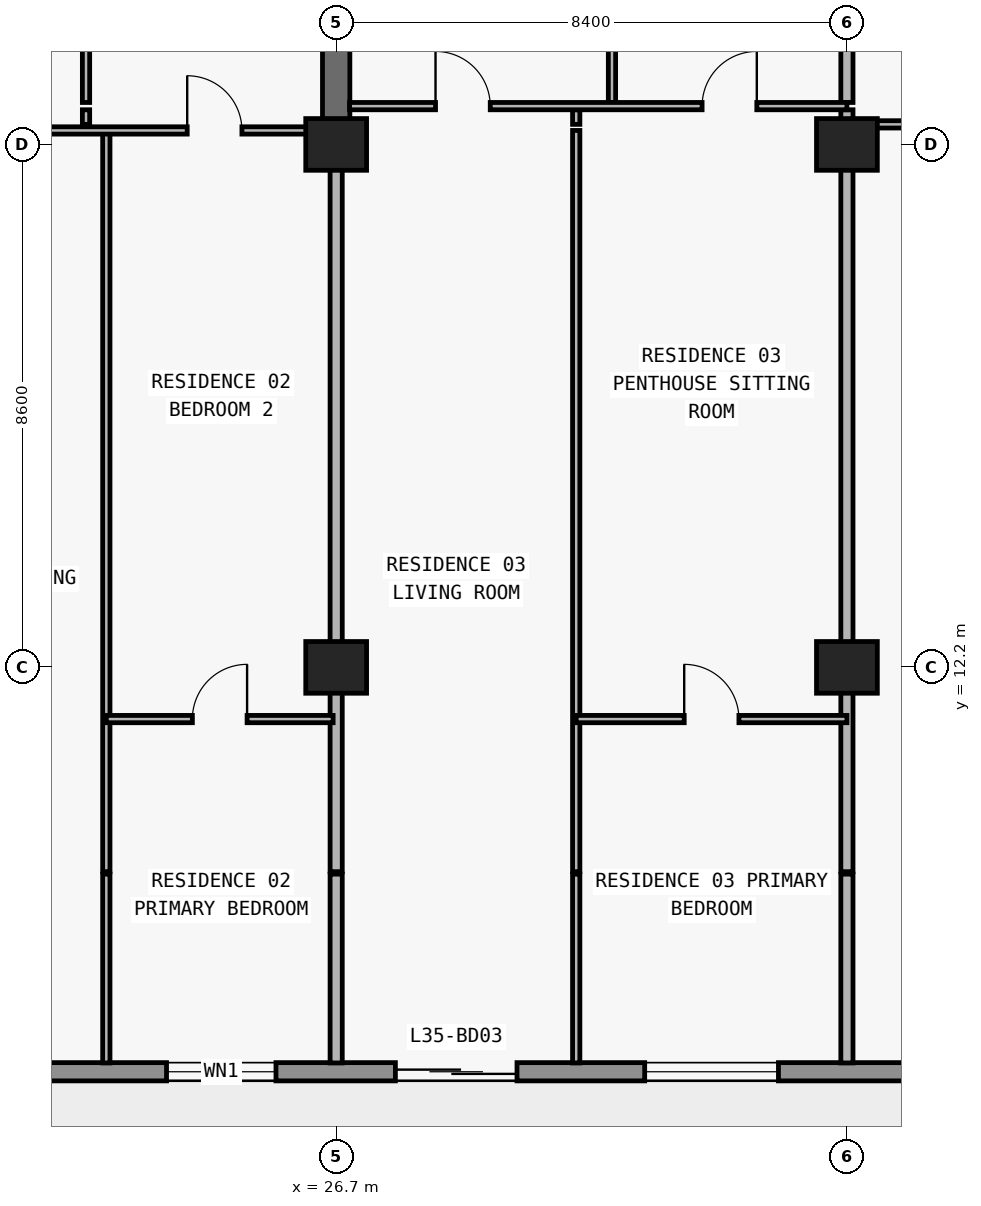
"""IFC4 building model, lengths in metres.
Left out: names, types, materials, properties, quantities, classifications, styles, units other than length and angle.
Written with IfcOpenShell. Run it as: python <this file> out.ifc"""

import sys

from ifc_helpers import new_model, si_unit, direction, frame, frame_2d, origin, origin_2d, place, context, subcontext, project, spatial, rectangle, extrude, element, fill, save


model = new_model("IFC4")
c1 = context("Model", 3, precision=1e-05, world=origin(), true_north=direction((0.0, 1.0)))
c2 = subcontext(c1, "Body", "Model", "MODEL_VIEW")
j1 = project(units=[si_unit("LENGTHUNIT", "METRE"), si_unit("PLANEANGLEUNIT", "RADIAN")], contexts=[c1])
p1 = place(None, origin())
s1 = spatial("IfcSite", under=j1, at=p1, CompositionType="ELEMENT")
p2 = place(p1, origin())
s2 = spatial("IfcBuilding", under=s1, at=p2, CompositionType="ELEMENT")
p3 = place(p2, frame((0.0, 0.0, 129.0)))
s3 = spatial("IfcBuildingStorey", under=s2, at=p3, CompositionType="ELEMENT", Elevation=129.0)
for number, where, z_axis, x_axis in (
    (1, (26.7, 12.2, 0.0), (0.0, 0.0, 1.0), (1.0, 0.0, 0.0)),
    (2, (35.1, 12.2, 0.0), (0.0, 0.0, 1.0), (1.0, 0.0, 0.0)),
    (3, (26.7, 20.8, 0.0), (0.0, 0.0, 1.0), (1.0, 0.0, 0.0)),
    (4, (35.1, 20.8, 0.0), (0.0, 0.0, 1.0), (1.0, 0.0, 0.0)),
):
    element("IfcColumn", number, at=place(p3, frame(where, z_axis=z_axis, x_axis=x_axis)), inside=s3, PredefinedType="COLUMN", context=c2, shape_type="SweptSolid", body=[
        extrude(rectangle(XDim=1.0, YDim=0.85, at=origin_2d()), origin(), (0.0, 0.0, 1.0), 3.05),
    ])
p4 = place(p3, frame((26.7, 20.8, 0.0), z_axis=(0.0, 0.0, 1.0), x_axis=(0.0, 1.0, 0.0)))
e5 = element("IfcWall", 5, at=p4, inside=s3, PredefinedType="SHEAR", context=c2, shape_type="SweptSolid", body=[
    extrude(rectangle(XDim=8.6, YDim=0.45, at=frame_2d((4.3, 0.0))), origin(), (0.0, 0.0, 1.0), 3.05),
])
p5 = place(p3, frame((70.1, 5.55, 0.0), z_axis=(0.0, 0.0, 1.0), x_axis=(-1.0, 0.0, 0.0)))
e6 = element("IfcWall", 6, at=p5, inside=s3, PredefinedType="STANDARD", context=c2, shape_type="SweptSolid", body=[
    extrude(rectangle(XDim=62.4, YDim=0.3, at=frame_2d((31.2, 0.0))), origin(), (0.0, 0.0, 1.0), 3.05),
])
p6 = place(p5, frame((57.226, 0.0, 0.0)))
e7 = element("IfcOpeningElement", 7, at=p6, cuts=e6, PredefinedType="OPENING", context=c2, shape_type="SweptSolid", body=[
    extrude(rectangle(XDim=2.0, YDim=2.3, at=frame_2d((1.0, 1.15))), frame((0.0, 0.16, 0.0), z_axis=(0.0, -1.0, 0.0), x_axis=(1.0, 0.0, 0.0)), (0.0, 0.0, 1.0), 0.32),
])
p7 = place(p5, frame((52.926, 0.0, 0.85)))
e8 = element("IfcOpeningElement", 8, at=p7, cuts=e6, PredefinedType="OPENING", context=c2, shape_type="SweptSolid", body=[
    extrude(rectangle(XDim=2.2, YDim=1.55, at=frame_2d((1.1, 0.775))), frame((0.0, 0.16, 0.0), z_axis=(0.0, -1.0, 0.0), x_axis=(1.0, 0.0, 0.0)), (0.0, 0.0, 1.0), 0.32),
])
p8 = place(p5, frame((48.49, 0.0, 0.0)))
e9 = element("IfcOpeningElement", 9, at=p8, cuts=e6, PredefinedType="OPENING", context=c2, shape_type="SweptSolid", body=[
    extrude(rectangle(XDim=2.0, YDim=2.3, at=frame_2d((1.0, 1.15))), frame((0.0, 0.16, 0.0), z_axis=(0.0, -1.0, 0.0), x_axis=(1.0, 0.0, 0.0)), (0.0, 0.0, 1.0), 0.32),
])
p9 = place(p5, frame((44.39, 0.0, 0.85)))
e10 = element("IfcOpeningElement", 10, at=p9, cuts=e6, PredefinedType="OPENING", context=c2, shape_type="SweptSolid", body=[
    extrude(rectangle(XDim=1.8, YDim=1.55, at=frame_2d((0.9, 0.775))), frame((0.0, 0.16, 0.0), z_axis=(0.0, -1.0, 0.0), x_axis=(1.0, 0.0, 0.0)), (0.0, 0.0, 1.0), 0.32),
])
p10 = place(p5, frame((40.426, 0.0, 0.0)))
e11 = element("IfcOpeningElement", 11, at=p10, cuts=e6, PredefinedType="OPENING", context=c2, shape_type="SweptSolid", body=[
    extrude(rectangle(XDim=2.0, YDim=2.3, at=frame_2d((1.0, 1.15))), frame((0.0, 0.16, 0.0), z_axis=(0.0, -1.0, 0.0), x_axis=(1.0, 0.0, 0.0)), (0.0, 0.0, 1.0), 0.32),
])
p11 = place(p5, frame((36.126, 0.0, 0.85)))
e12 = element("IfcOpeningElement", 12, at=p11, cuts=e6, PredefinedType="OPENING", context=c2, shape_type="SweptSolid", body=[
    extrude(rectangle(XDim=2.2, YDim=1.55, at=frame_2d((1.1, 0.775))), frame((0.0, 0.16, 0.0), z_axis=(0.0, -1.0, 0.0), x_axis=(1.0, 0.0, 0.0)), (0.0, 0.0, 1.0), 0.32),
])
p12 = place(p5, frame((31.91, 0.0, 0.0)))
e13 = element("IfcOpeningElement", 13, at=p12, cuts=e6, PredefinedType="OPENING", context=c2, shape_type="SweptSolid", body=[
    extrude(rectangle(XDim=2.0, YDim=2.3, at=frame_2d((1.0, 1.15))), frame((0.0, 0.16, 0.0), z_axis=(0.0, -1.0, 0.0), x_axis=(1.0, 0.0, 0.0)), (0.0, 0.0, 1.0), 0.32),
])
p13 = place(p5, frame((28.21, 0.0, 0.85)))
e14 = element("IfcOpeningElement", 14, at=p13, cuts=e6, PredefinedType="OPENING", context=c2, shape_type="SweptSolid", body=[
    extrude(rectangle(XDim=1.8, YDim=1.55, at=frame_2d((0.9, 0.775))), frame((0.0, 0.16, 0.0), z_axis=(0.0, -1.0, 0.0), x_axis=(1.0, 0.0, 0.0)), (0.0, 0.0, 1.0), 0.32),
])
p14 = place(p5, frame((24.426, 0.0, 0.0)))
e15 = element("IfcOpeningElement", 15, at=p14, cuts=e6, PredefinedType="OPENING", context=c2, shape_type="SweptSolid", body=[
    extrude(rectangle(XDim=2.0, YDim=2.3, at=frame_2d((1.0, 1.15))), frame((0.0, 0.16, 0.0), z_axis=(0.0, -1.0, 0.0), x_axis=(1.0, 0.0, 0.0)), (0.0, 0.0, 1.0), 0.32),
])
p15 = place(p5, frame((20.126, 0.0, 0.85)))
e16 = element("IfcOpeningElement", 16, at=p15, cuts=e6, PredefinedType="OPENING", context=c2, shape_type="SweptSolid", body=[
    extrude(rectangle(XDim=2.2, YDim=1.55, at=frame_2d((1.1, 0.775))), frame((0.0, 0.16, 0.0), z_axis=(0.0, -1.0, 0.0), x_axis=(1.0, 0.0, 0.0)), (0.0, 0.0, 1.0), 0.32),
])
p16 = place(p5, frame((15.69, 0.0, 0.0)))
e17 = element("IfcOpeningElement", 17, at=p16, cuts=e6, PredefinedType="OPENING", context=c2, shape_type="SweptSolid", body=[
    extrude(rectangle(XDim=2.0, YDim=2.3, at=frame_2d((1.0, 1.15))), frame((0.0, 0.16, 0.0), z_axis=(0.0, -1.0, 0.0), x_axis=(1.0, 0.0, 0.0)), (0.0, 0.0, 1.0), 0.32),
])
p17 = place(p5, frame((11.59, 0.0, 0.85)))
e18 = element("IfcOpeningElement", 18, at=p17, cuts=e6, PredefinedType="OPENING", context=c2, shape_type="SweptSolid", body=[
    extrude(rectangle(XDim=1.8, YDim=1.55, at=frame_2d((0.9, 0.775))), frame((0.0, 0.16, 0.0), z_axis=(0.0, -1.0, 0.0), x_axis=(1.0, 0.0, 0.0)), (0.0, 0.0, 1.0), 0.32),
])
p18 = place(p5, frame((7.626, 0.0, 0.0)))
e19 = element("IfcOpeningElement", 19, at=p18, cuts=e6, PredefinedType="OPENING", context=c2, shape_type="SweptSolid", body=[
    extrude(rectangle(XDim=2.0, YDim=2.3, at=frame_2d((1.0, 1.15))), frame((0.0, 0.16, 0.0), z_axis=(0.0, -1.0, 0.0), x_axis=(1.0, 0.0, 0.0)), (0.0, 0.0, 1.0), 0.32),
])
p19 = place(p5, frame((3.326, 0.0, 0.85)))
e20 = element("IfcOpeningElement", 20, at=p19, cuts=e6, PredefinedType="OPENING", context=c2, shape_type="SweptSolid", body=[
    extrude(rectangle(XDim=2.2, YDim=1.55, at=frame_2d((1.1, 0.775))), frame((0.0, 0.16, 0.0), z_axis=(0.0, -1.0, 0.0), x_axis=(1.0, 0.0, 0.0)), (0.0, 0.0, 1.0), 0.32),
])
p20 = place(p3, frame((22.586, 21.13, 0.0), z_axis=(0.0, 0.0, 1.0), x_axis=(0.0, 1.0, 0.0)))
e21 = element("IfcWall", 21, at=p20, inside=s3, PredefinedType="PARTITIONING", context=c2, shape_type="SweptSolid", body=[
    extrude(rectangle(XDim=0.24, YDim=0.12, at=frame_2d((0.12, 0.0))), origin(), (0.0, 0.0, 1.0), 3.05),
])
p21 = place(p3, frame((22.586, 21.49, 0.0), z_axis=(0.0, 0.0, 1.0), x_axis=(0.0, 1.0, 0.0)))
e22 = element("IfcWall", 22, at=p21, inside=s3, PredefinedType="PARTITIONING", context=c2, shape_type="SweptSolid", body=[
    extrude(rectangle(XDim=4.69, YDim=0.12, at=frame_2d((2.345, 0.0))), origin(), (0.0, 0.0, 1.0), 3.05),
])
p22 = place(p21, frame((1.895, 0.0, 0.0)))
e23 = element("IfcOpeningElement", 23, at=p22, cuts=e22, PredefinedType="OPENING", context=c2, shape_type="SweptSolid", body=[
    extrude(rectangle(XDim=0.9, YDim=2.15, at=frame_2d((0.45, 1.075))), frame((0.0, 0.07, 0.0), z_axis=(0.0, -1.0, 0.0), x_axis=(1.0, 0.0, 0.0)), (0.0, 0.0, 1.0), 0.14),
])
p23 = place(p3, frame((22.92, 5.695, 0.0), z_axis=(0.0, 0.0, 1.0), x_axis=(0.0, 1.0, 0.0)))
e24 = element("IfcWall", 24, at=p23, inside=s3, PredefinedType="PARTITIONING", context=c2, shape_type="SweptSolid", body=[
    extrude(rectangle(XDim=3.105, YDim=0.12, at=frame_2d((1.552, 0.0))), origin(), (0.0, 0.0, 1.0), 3.05),
])
p24 = place(p3, frame((22.92, 8.84, 0.0), z_axis=(0.0, 0.0, 1.0), x_axis=(0.0, 1.0, 0.0)))
e25 = element("IfcWall", 25, at=p24, inside=s3, PredefinedType="PARTITIONING", context=c2, shape_type="SweptSolid", body=[
    extrude(rectangle(XDim=12.19, YDim=0.12, at=frame_2d((6.095, 0.0))), origin(), (0.0, 0.0, 1.0), 3.05),
])
p25 = place(p3, frame((26.7, 5.695, 0.0), z_axis=(0.0, 0.0, 1.0), x_axis=(0.0, 1.0, 0.0)))
e26 = element("IfcWall", 26, at=p25, inside=s3, PredefinedType="PARTITIONING", context=c2, shape_type="SweptSolid", body=[
    extrude(rectangle(XDim=3.105, YDim=0.2, at=frame_2d((1.552, 0.0))), origin(), (0.0, 0.0, 1.0), 3.05),
])
p26 = place(p3, frame((26.7, 8.84, 0.0), z_axis=(0.0, 0.0, 1.0), x_axis=(0.0, 1.0, 0.0)))
e27 = element("IfcWall", 27, at=p26, inside=s3, PredefinedType="PARTITIONING", context=c2, shape_type="SweptSolid", body=[
    extrude(rectangle(XDim=11.955, YDim=0.2, at=frame_2d((5.978, 0.0))), origin(), (0.0, 0.0, 1.0), 2.174),
])
p27 = place(p3, frame((30.648, 5.695, 0.0), z_axis=(0.0, 0.0, 1.0), x_axis=(0.0, 1.0, 0.0)))
e28 = element("IfcWall", 28, at=p27, inside=s3, PredefinedType="PARTITIONING", context=c2, shape_type="SweptSolid", body=[
    extrude(rectangle(XDim=3.105, YDim=0.12, at=frame_2d((1.552, 0.0))), origin(), (0.0, 0.0, 1.0), 3.05),
])
p28 = place(p3, frame((30.648, 8.84, 0.0), z_axis=(0.0, 0.0, 1.0), x_axis=(0.0, 1.0, 0.0)))
e29 = element("IfcWall", 29, at=p28, inside=s3, PredefinedType="PARTITIONING", context=c2, shape_type="SweptSolid", body=[
    extrude(rectangle(XDim=12.19, YDim=0.12, at=frame_2d((6.095, 0.0))), origin(), (0.0, 0.0, 1.0), 3.05),
])
p29 = place(p3, frame((30.648, 21.13, 0.0), z_axis=(0.0, 0.0, 1.0), x_axis=(0.0, 1.0, 0.0)))
e30 = element("IfcWall", 30, at=p29, inside=s3, PredefinedType="PARTITIONING", context=c2, shape_type="SweptSolid", body=[
    extrude(rectangle(XDim=0.24, YDim=0.12, at=frame_2d((0.12, 0.0))), origin(), (0.0, 0.0, 1.0), 3.05),
])
p30 = place(p3, frame((31.236, 21.49, 0.0), z_axis=(0.0, 0.0, 1.0), x_axis=(0.0, 1.0, 0.0)))
e31 = element("IfcWall", 31, at=p30, inside=s3, PredefinedType="PARTITIONING", context=c2, shape_type="SweptSolid", body=[
    extrude(rectangle(XDim=4.69, YDim=0.12, at=frame_2d((2.345, 0.0))), origin(), (0.0, 0.0, 1.0), 3.05),
])
p31 = place(p30, frame((1.895, 0.0, 0.0)))
e32 = element("IfcOpeningElement", 32, at=p31, cuts=e31, PredefinedType="OPENING", context=c2, shape_type="SweptSolid", body=[
    extrude(rectangle(XDim=0.9, YDim=2.15, at=frame_2d((0.45, 1.075))), frame((0.0, 0.07, 0.0), z_axis=(0.0, -1.0, 0.0), x_axis=(1.0, 0.0, 0.0)), (0.0, 0.0, 1.0), 0.14),
])
p32 = place(p3, frame((35.1, 5.695, 0.0), z_axis=(0.0, 0.0, 1.0), x_axis=(0.0, 1.0, 0.0)))
e33 = element("IfcWall", 33, at=p32, inside=s3, PredefinedType="PARTITIONING", context=c2, shape_type="SweptSolid", body=[
    extrude(rectangle(XDim=3.105, YDim=0.2, at=frame_2d((1.552, 0.0))), origin(), (0.0, 0.0, 1.0), 3.05),
])
p33 = place(p3, frame((35.1, 8.84, 0.0), z_axis=(0.0, 0.0, 1.0), x_axis=(0.0, 1.0, 0.0)))
e34 = element("IfcWall", 34, at=p33, inside=s3, PredefinedType="PARTITIONING", context=c2, shape_type="SweptSolid", body=[
    extrude(rectangle(XDim=12.19, YDim=0.2, at=frame_2d((6.095, 0.0))), origin(), (0.0, 0.0, 1.0), 2.174),
])
p34 = place(p3, frame((35.1, 21.13, 0.0), z_axis=(0.0, 0.0, 1.0), x_axis=(0.0, 1.0, 0.0)))
e35 = element("IfcWall", 35, at=p34, inside=s3, PredefinedType="PARTITIONING", context=c2, shape_type="SweptSolid", body=[
    extrude(rectangle(XDim=0.24, YDim=0.2, at=frame_2d((0.12, 0.0))), origin(), (0.0, 0.0, 1.0), 2.174),
])
p35 = place(p3, frame((35.1, 21.49, 0.0), z_axis=(0.0, 0.0, 1.0), x_axis=(0.0, 1.0, 0.0)))
e36 = element("IfcWall", 36, at=p35, inside=s3, PredefinedType="PARTITIONING", context=c2, shape_type="SweptSolid", body=[
    extrude(rectangle(XDim=4.69, YDim=0.2, at=frame_2d((2.345, 0.0))), origin(), (0.0, 0.0, 1.0), 2.174),
])
p36 = place(p3, frame((22.92, 11.35, 0.0), z_axis=(0.0, 0.0, 1.0), x_axis=(1.0, 0.0, 0.0)))
e37 = element("IfcWall", 37, at=p36, inside=s3, PredefinedType="PARTITIONING", context=c2, shape_type="SweptSolid", body=[
    extrude(rectangle(XDim=3.73, YDim=0.12, at=frame_2d((1.865, 0.0))), origin(), (0.0, 0.0, 1.0), 3.05),
])
p37 = place(p36, frame((1.415, 0.0, 0.0)))
e38 = element("IfcOpeningElement", 38, at=p37, cuts=e37, PredefinedType="OPENING", context=c2, shape_type="SweptSolid", body=[
    extrude(rectangle(XDim=0.9, YDim=2.15, at=frame_2d((0.45, 1.075))), frame((0.0, 0.07, 0.0), z_axis=(0.0, -1.0, 0.0), x_axis=(1.0, 0.0, 0.0)), (0.0, 0.0, 1.0), 0.14),
])
p38 = place(p3, frame((30.648, 11.35, 0.0), z_axis=(0.0, 0.0, 1.0), x_axis=(1.0, 0.0, 0.0)))
e39 = element("IfcWall", 39, at=p38, inside=s3, PredefinedType="PARTITIONING", context=c2, shape_type="SweptSolid", body=[
    extrude(rectangle(XDim=4.452, YDim=0.12, at=frame_2d((2.226, 0.0))), origin(), (0.0, 0.0, 1.0), 3.05),
])
p39 = place(p38, frame((1.776, 0.0, 0.0)))
e40 = element("IfcOpeningElement", 40, at=p39, cuts=e39, PredefinedType="OPENING", context=c2, shape_type="SweptSolid", body=[
    extrude(rectangle(XDim=0.9, YDim=2.15, at=frame_2d((0.45, 1.075))), frame((0.0, 0.07, 0.0), z_axis=(0.0, -1.0, 0.0), x_axis=(1.0, 0.0, 0.0)), (0.0, 0.0, 1.0), 0.14),
])
p40 = place(p3, frame((18.3, 21.03, 0.0), z_axis=(0.0, 0.0, 1.0), x_axis=(1.0, 0.0, 0.0)))
e41 = element("IfcWall", 41, at=p40, inside=s3, PredefinedType="PARTITIONING", context=c2, shape_type="SweptSolid", body=[
    extrude(rectangle(XDim=8.18, YDim=0.12, at=frame_2d((4.09, 0.0))), origin(), (0.0, 0.0, 1.0), 2.174),
])
p41 = place(p40, frame((1.693, 0.0, 0.0)))
e42 = element("IfcOpeningElement", 42, at=p41, cuts=e41, PredefinedType="OPENING", context=c2, shape_type="SweptSolid", body=[
    extrude(rectangle(XDim=0.9, YDim=2.124, at=frame_2d((0.45, 1.062))), frame((0.0, 0.07, 0.0), z_axis=(0.0, -1.0, 0.0), x_axis=(1.0, 0.0, 0.0)), (0.0, 0.0, 1.0), 0.14),
])
p42 = place(p40, frame((5.95, 0.0, 0.0)))
e43 = element("IfcOpeningElement", 43, at=p42, cuts=e41, PredefinedType="OPENING", context=c2, shape_type="SweptSolid", body=[
    extrude(rectangle(XDim=0.9, YDim=2.124, at=frame_2d((0.45, 1.062))), frame((0.0, 0.07, 0.0), z_axis=(0.0, -1.0, 0.0), x_axis=(1.0, 0.0, 0.0)), (0.0, 0.0, 1.0), 0.14),
])
p43 = place(p3, frame((35.1, 21.13, 0.0), z_axis=(0.0, 0.0, 1.0), x_axis=(1.0, 0.0, 0.0)))
e44 = element("IfcWall", 44, at=p43, inside=s3, PredefinedType="PARTITIONING", context=c2, shape_type="SweptSolid", body=[
    extrude(rectangle(XDim=7.6, YDim=0.12, at=frame_2d((3.8, 0.0))), origin(), (0.0, 0.0, 1.0), 2.174),
])
p44 = place(p43, frame((1.64, 0.0, 0.0)))
e45 = element("IfcOpeningElement", 45, at=p44, cuts=e44, PredefinedType="OPENING", context=c2, shape_type="SweptSolid", body=[
    extrude(rectangle(XDim=0.9, YDim=2.124, at=frame_2d((0.45, 1.062))), frame((0.0, 0.07, 0.0), z_axis=(0.0, -1.0, 0.0), x_axis=(1.0, 0.0, 0.0)), (0.0, 0.0, 1.0), 0.14),
])
p45 = place(p43, frame((5.527, 0.0, 0.0)))
e46 = element("IfcOpeningElement", 46, at=p45, cuts=e44, PredefinedType="OPENING", context=c2, shape_type="SweptSolid", body=[
    extrude(rectangle(XDim=0.9, YDim=2.124, at=frame_2d((0.45, 1.062))), frame((0.0, 0.07, 0.0), z_axis=(0.0, -1.0, 0.0), x_axis=(1.0, 0.0, 0.0)), (0.0, 0.0, 1.0), 0.14),
])
p46 = place(p3, frame((26.92, 21.43, 0.0), z_axis=(0.0, 0.0, 1.0), x_axis=(1.0, 0.0, 0.0)))
e47 = element("IfcWall", 47, at=p46, inside=s3, PredefinedType="PARTITIONING", context=c2, shape_type="SweptSolid", body=[
    extrude(rectangle(XDim=8.18, YDim=0.12, at=frame_2d((4.09, 0.0))), origin(), (0.0, 0.0, 1.0), 3.05),
])
p47 = place(p46, frame((1.414, 0.0, 0.0)))
e48 = element("IfcOpeningElement", 48, at=p47, cuts=e47, PredefinedType="OPENING", context=c2, shape_type="SweptSolid", body=[
    extrude(rectangle(XDim=0.9, YDim=2.15, at=frame_2d((0.45, 1.075))), frame((0.0, 0.07, 0.0), z_axis=(0.0, -1.0, 0.0), x_axis=(1.0, 0.0, 0.0)), (0.0, 0.0, 1.0), 0.14),
])
p48 = place(p46, frame((5.798, 0.0, 0.0)))
e49 = element("IfcOpeningElement", 49, at=p48, cuts=e47, PredefinedType="OPENING", context=c2, shape_type="SweptSolid", body=[
    extrude(rectangle(XDim=0.9, YDim=2.15, at=frame_2d((0.45, 1.075))), frame((0.0, 0.07, 0.0), z_axis=(0.0, -1.0, 0.0), x_axis=(1.0, 0.0, 0.0)), (0.0, 0.0, 1.0), 0.14),
])
p49 = place(p9, origin())
e50 = element("IfcWindow", 50, at=p49, inside=s3, PartitioningType="SINGLE_PANEL", PredefinedType="WINDOW", context=c2, shape_type="SweptSolid", body=[
    extrude(rectangle(XDim=1.8, YDim=1.55, at=frame_2d((0.9, 0.775))), frame((0.0, 0.03, 0.0), z_axis=(0.0, -1.0, 0.0), x_axis=(1.0, 0.0, 0.0)), (0.0, 0.0, 1.0), 0.06),
])
fill(e10, e50)
p50 = place(p10, origin())
e51 = element("IfcDoor", 51, at=p50, inside=s3, OperationType="DOUBLE_DOOR_SLIDING", PredefinedType="DOOR", context=c2, shape_type="SweptSolid", body=[
    extrude(rectangle(XDim=2.0, YDim=2.3, at=frame_2d((1.0, 1.15))), frame((0.0, 0.025, 0.0), z_axis=(0.0, -1.0, 0.0), x_axis=(1.0, 0.0, 0.0)), (0.0, 0.0, 1.0), 0.05),
])
fill(e11, e51)
p51 = place(p11, origin())
e52 = element("IfcWindow", 52, at=p51, inside=s3, PartitioningType="SINGLE_PANEL", PredefinedType="WINDOW", context=c2, shape_type="SweptSolid", body=[
    extrude(rectangle(XDim=2.2, YDim=1.55, at=frame_2d((1.1, 0.775))), frame((0.0, 0.03, 0.0), z_axis=(0.0, -1.0, 0.0), x_axis=(1.0, 0.0, 0.0)), (0.0, 0.0, 1.0), 0.06),
])
fill(e12, e52)
p52 = place(p42, origin())
e53 = element("IfcDoor", 53, at=p52, inside=s3, OperationType="SINGLE_SWING_LEFT", PredefinedType="DOOR", context=c2, shape_type="SweptSolid", body=[
    extrude(rectangle(XDim=0.9, YDim=2.124, at=frame_2d((0.45, 1.062))), frame((0.0, 0.025, 0.0), z_axis=(0.0, -1.0, 0.0), x_axis=(1.0, 0.0, 0.0)), (0.0, 0.0, 1.0), 0.05),
])
fill(e43, e53)
p53 = place(p37, origin())
e54 = element("IfcDoor", 54, at=p53, inside=s3, OperationType="SINGLE_SWING_RIGHT", PredefinedType="DOOR", context=c2, shape_type="SweptSolid", body=[
    extrude(rectangle(XDim=0.9, YDim=2.15, at=frame_2d((0.45, 1.075))), frame((0.0, 0.025, 0.0), z_axis=(0.0, -1.0, 0.0), x_axis=(1.0, 0.0, 0.0)), (0.0, 0.0, 1.0), 0.05),
])
fill(e38, e54)
p54 = place(p47, origin())
e55 = element("IfcDoor", 55, at=p54, inside=s3, OperationType="SINGLE_SWING_LEFT", PredefinedType="DOOR", context=c2, shape_type="SweptSolid", body=[
    extrude(rectangle(XDim=0.9, YDim=2.15, at=frame_2d((0.45, 1.075))), frame((0.0, 0.025, 0.0), z_axis=(0.0, -1.0, 0.0), x_axis=(1.0, 0.0, 0.0)), (0.0, 0.0, 1.0), 0.05),
])
fill(e48, e55)
p55 = place(p48, origin())
e56 = element("IfcDoor", 56, at=p55, inside=s3, OperationType="SINGLE_SWING_RIGHT", PredefinedType="DOOR", context=c2, shape_type="SweptSolid", body=[
    extrude(rectangle(XDim=0.9, YDim=2.15, at=frame_2d((0.45, 1.075))), frame((0.0, 0.025, 0.0), z_axis=(0.0, -1.0, 0.0), x_axis=(1.0, 0.0, 0.0)), (0.0, 0.0, 1.0), 0.05),
])
fill(e49, e56)
p56 = place(p39, origin())
e57 = element("IfcDoor", 57, at=p56, inside=s3, OperationType="SINGLE_SWING_LEFT", PredefinedType="DOOR", context=c2, shape_type="SweptSolid", body=[
    extrude(rectangle(XDim=0.9, YDim=2.15, at=frame_2d((0.45, 1.075))), frame((0.0, 0.025, 0.0), z_axis=(0.0, -1.0, 0.0), x_axis=(1.0, 0.0, 0.0)), (0.0, 0.0, 1.0), 0.05),
])
fill(e40, e57)
save(model, sys.argv[1])
